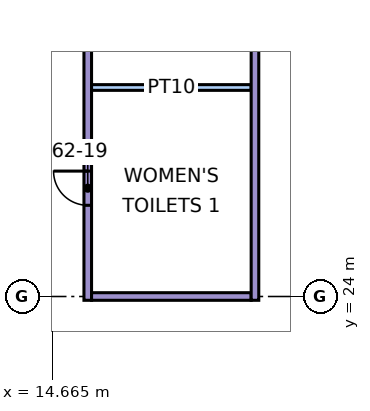
"""IFC4 building model, lengths in metres.
Left out: names, types, materials, properties, quantities, classifications, styles, units other than length and angle.
Written with IfcOpenShell. Run it as: python <this file> out.ifc"""

import sys

from ifc_helpers import new_model, si_unit, direction, frame, frame_2d, origin, place, context, subcontext, project, spatial, rectangle, extrude, element, fill, save


model = new_model("IFC4")
c1 = context("Model", 3, precision=1e-05, world=origin(), true_north=direction((0.0, 1.0)))
c2 = subcontext(c1, "Body", "Model", "MODEL_VIEW")
j1 = project(units=[si_unit("LENGTHUNIT", "METRE"), si_unit("PLANEANGLEUNIT", "RADIAN")], contexts=[c1])
p1 = place(None, origin())
s1 = spatial("IfcSite", under=j1, at=p1, CompositionType="ELEMENT")
p2 = place(p1, origin())
s2 = spatial("IfcBuilding", under=s1, at=p2, CompositionType="ELEMENT")
p3 = place(p2, frame((0.0, 0.0, 262.15)))
s3 = spatial("IfcBuildingStorey", under=s2, at=p3, CompositionType="ELEMENT", Elevation=262.15)
p4 = place(p3, frame((15.6, 23.9, 0.0), z_axis=(0.0, 0.0, 1.0), x_axis=(0.0, 1.0, 0.0)))
e1 = element("IfcWall", 1, at=p4, inside=s3, PredefinedType="PARTITIONING", context=c2, shape_type="SweptSolid", body=[
    extrude(rectangle(XDim=23.875, YDim=0.2, at=frame_2d((11.938, 0.0))), origin(), (0.0, 0.0, 1.0), 10.85),
])
p5 = place(p4, frame((19.5, 0.0, 0.0)))
e2 = element("IfcOpeningElement", 2, at=p5, cuts=e1, PredefinedType="OPENING", context=c2, shape_type="SweptSolid", body=[
    extrude(rectangle(XDim=1.0, YDim=2.1, at=frame_2d((0.5, 1.05))), frame((0.0, 0.11, 0.0), z_axis=(0.0, -1.0, 0.0), x_axis=(1.0, 0.0, 0.0)), (0.0, 0.0, 1.0), 0.22),
])
p6 = place(p4, frame((10.75, 0.0, 0.0)))
e3 = element("IfcOpeningElement", 3, at=p6, cuts=e1, PredefinedType="OPENING", context=c2, shape_type="SweptSolid", body=[
    extrude(rectangle(XDim=0.9, YDim=2.1, at=frame_2d((0.45, 1.05))), frame((0.0, 0.11, 0.0), z_axis=(0.0, -1.0, 0.0), x_axis=(1.0, 0.0, 0.0)), (0.0, 0.0, 1.0), 0.22),
])
p7 = place(p4, frame((7.5, 0.0, 0.0)))
e4 = element("IfcOpeningElement", 4, at=p7, cuts=e1, PredefinedType="OPENING", context=c2, shape_type="SweptSolid", body=[
    extrude(rectangle(XDim=0.9, YDim=2.1, at=frame_2d((0.45, 1.05))), frame((0.0, 0.11, 0.0), z_axis=(0.0, -1.0, 0.0), x_axis=(1.0, 0.0, 0.0)), (0.0, 0.0, 1.0), 0.22),
])
p8 = place(p4, frame((2.5, 0.0, 0.0)))
e5 = element("IfcOpeningElement", 5, at=p8, cuts=e1, PredefinedType="OPENING", context=c2, shape_type="SweptSolid", body=[
    extrude(rectangle(XDim=0.9, YDim=2.1, at=frame_2d((0.45, 1.05))), frame((0.0, 0.11, 0.0), z_axis=(0.0, -1.0, 0.0), x_axis=(1.0, 0.0, 0.0)), (0.0, 0.0, 1.0), 0.22),
])
p9 = place(p3, frame((15.7, 24.0, 0.0), z_axis=(0.0, 0.0, 1.0), x_axis=(1.0, 0.0, 0.0)))
e6 = element("IfcWall", 6, at=p9, inside=s3, PredefinedType="PARTITIONING", context=c2, shape_type="SweptSolid", body=[
    extrude(rectangle(XDim=4.2, YDim=0.2, at=frame_2d((2.1, 0.0))), origin(), (0.0, 0.0, 1.0), 10.85),
])
p10 = place(p3, frame((15.7, 29.5, 0.0), z_axis=(0.0, 0.0, 1.0), x_axis=(1.0, 0.0, 0.0)))
e7 = element("IfcWall", 7, at=p10, inside=s3, PredefinedType="PARTITIONING", context=c2, shape_type="SweptSolid", body=[
    extrude(rectangle(XDim=4.2, YDim=0.15, at=frame_2d((2.1, 0.0))), origin(), (0.0, 0.0, 1.0), 10.85),
])
p11 = place(p3, frame((20.0, 23.9, 0.0), z_axis=(0.0, 0.0, 1.0), x_axis=(0.0, 1.0, 0.0)))
e8 = element("IfcWall", 8, at=p11, inside=s3, PredefinedType="PARTITIONING", context=c2, shape_type="SweptSolid", body=[
    extrude(rectangle(XDim=12.0, YDim=0.2, at=frame_2d((6.0, 0.0))), origin(), (0.0, 0.0, 1.0), 10.85),
])
p12 = place(p8, frame((0.9, 0.0, 0.0), z_axis=(0.0, 0.0, 1.0), x_axis=(-1.0, 0.0, 0.0)))
e9 = element("IfcDoor", 9, at=p12, inside=s3, OperationType="SINGLE_SWING_RIGHT", PredefinedType="DOOR", context=c2, shape_type="SweptSolid", body=[
    extrude(rectangle(XDim=0.9, YDim=2.1, at=frame_2d((0.45, 1.05))), frame((0.0, 0.025, 0.0), z_axis=(0.0, -1.0, 0.0), x_axis=(1.0, 0.0, 0.0)), (0.0, 0.0, 1.0), 0.05),
])
fill(e5, e9)
save(model, sys.argv[1])
